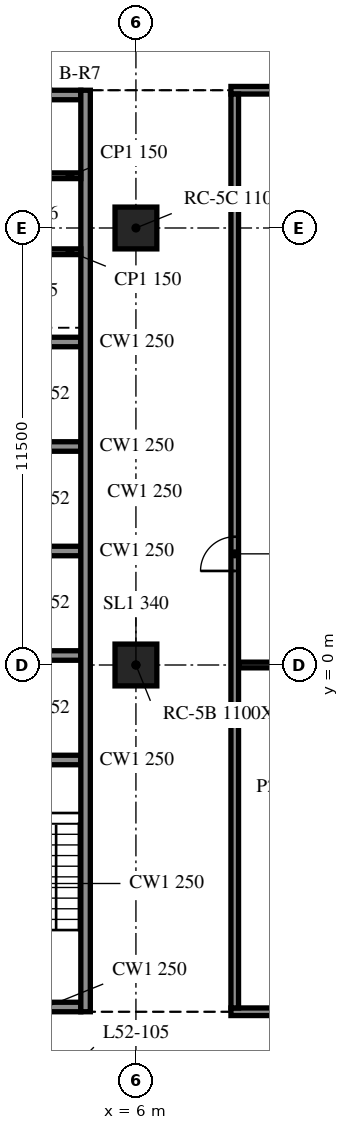
"""IFC4 building model, lengths in metres.
Left out: names, types, materials, properties, quantities, classifications, styles, units other than length and angle.
Written with IfcOpenShell. Run it as: python <this file> out.ifc"""

import sys

from ifc_helpers import new_model, si_unit, direction, frame, frame_2d, origin, origin_2d, place, context, subcontext, project, spatial, rectangle, extrude, element, fill, save


model = new_model("IFC4")
c1 = context("Model", 3, precision=1e-05, world=origin(), true_north=direction((0.0, 1.0)))
c2 = subcontext(c1, "Body", "Model", "MODEL_VIEW")
j1 = project(units=[si_unit("LENGTHUNIT", "METRE"), si_unit("PLANEANGLEUNIT", "RADIAN")], contexts=[c1])
p1 = place(None, origin())
s1 = spatial("IfcSite", under=j1, at=p1, CompositionType="ELEMENT")
p2 = place(p1, origin())
s2 = spatial("IfcBuilding", under=s1, at=p2, CompositionType="ELEMENT")
p3 = place(p2, frame((0.0, 0.0, 216.7)))
s3 = spatial("IfcBuildingStorey", under=s2, at=p3, CompositionType="ELEMENT", Elevation=216.7)
for number, where, z_axis, x_axis in (
    (1, (6.0, 0.0, -0.34), (0.0, 0.0, 1.0), (1.0, 0.0, 0.0)),
    (2, (6.0, 11.5, -0.34), (0.0, 0.0, 1.0), (1.0, 0.0, 0.0)),
):
    element("IfcColumn", number, at=place(p3, frame(where, z_axis=z_axis, x_axis=x_axis)), inside=s3, PredefinedType="COLUMN", context=c2, shape_type="SweptSolid", body=[
        extrude(rectangle(XDim=1.1, YDim=1.1, at=origin_2d()), origin(), (0.0, 0.0, 1.0), 3.8),
    ])
p4 = place(p3, frame((4.675, -9.125, 0.0), z_axis=(0.0, 0.0, 1.0), x_axis=(0.0, 1.0, 0.0)))
e3 = element("IfcWall", 3, at=p4, inside=s3, PredefinedType="SOLIDWALL", context=c2, shape_type="SweptSolid", body=[
    extrude(rectangle(XDim=24.25, YDim=0.25, at=frame_2d((12.125, 0.0))), origin(), (0.0, 0.0, 1.0), 3.46),
])
p5 = place(p3, frame((4.55, -9.0, 0.0), z_axis=(0.0, 0.0, 1.0), x_axis=(-1.0, 0.0, 0.0)))
e4 = element("IfcWall", 4, at=p5, inside=s3, PredefinedType="SOLIDWALL", context=c2, shape_type="SweptSolid", body=[
    extrude(rectangle(XDim=9.1, YDim=0.25, at=frame_2d((4.55, 0.0))), origin(), (0.0, 0.0, 1.0), 3.46),
])
p6 = place(p5, frame((3.65, 0.0, 0.0)))
e5 = element("IfcOpeningElement", 5, at=p6, cuts=e4, PredefinedType="OPENING", context=c2, shape_type="SweptSolid", body=[
    extrude(rectangle(XDim=1.8, YDim=2.1, at=frame_2d((0.9, 1.05))), frame((0.0, 0.135, 0.0), z_axis=(0.0, -1.0, 0.0), x_axis=(1.0, 0.0, 0.0)), (0.0, 0.0, 1.0), 0.27),
])
p7 = place(p3, frame((-4.55, 15.0, 0.0), z_axis=(0.0, 0.0, 1.0), x_axis=(1.0, 0.0, 0.0)))
e6 = element("IfcWall", 6, at=p7, inside=s3, PredefinedType="SOLIDWALL", context=c2, shape_type="SweptSolid", body=[
    extrude(rectangle(XDim=9.1, YDim=0.25, at=frame_2d((4.55, 0.0))), origin(), (0.0, 0.0, 1.0), 3.46),
])
p8 = place(p7, frame((3.65, 0.0, 0.0)))
e7 = element("IfcOpeningElement", 7, at=p8, cuts=e6, PredefinedType="OPENING", context=c2, shape_type="SweptSolid", body=[
    extrude(rectangle(XDim=1.8, YDim=2.1, at=frame_2d((0.9, 1.05))), frame((0.0, 0.135, 0.0), z_axis=(0.0, -1.0, 0.0), x_axis=(1.0, 0.0, 0.0)), (0.0, 0.0, 1.0), 0.27),
])
for number, where, z_axis, x_axis in (
    (8, (1.7, -2.5, 0.0), (0.0, 0.0, 1.0), (1.0, 0.0, 0.0)),
    (9, (1.7, 0.25, 0.0), (0.0, 0.0, 1.0), (1.0, 0.0, 0.0)),
    (10, (1.7, 3.0, 0.0), (0.0, 0.0, 1.0), (1.0, 0.0, 0.0)),
    (11, (1.7, 5.75, 0.0), (0.0, 0.0, 1.0), (1.0, 0.0, 0.0)),
    (12, (1.7, 8.5, 0.0), (0.0, 0.0, 1.0), (1.0, 0.0, 0.0)),
):
    element("IfcWall", number, at=place(p3, frame(where, z_axis=z_axis, x_axis=x_axis)), inside=s3, PredefinedType="SOLIDWALL", context=c2, shape_type="SweptSolid", body=[
        extrude(rectangle(XDim=2.85, YDim=0.25, at=frame_2d((1.425, 0.0))), origin(), (0.0, 0.0, 1.0), 3.46),
    ])
for number, where, z_axis, x_axis in (
    (13, (1.7, 10.875, 0.0), (0.0, 0.0, 1.0), (1.0, 0.0, 0.0)),
    (14, (1.7, 12.875, 0.0), (0.0, 0.0, 1.0), (1.0, 0.0, 0.0)),
):
    element("IfcWall", number, at=place(p3, frame(where, z_axis=z_axis, x_axis=x_axis)), inside=s3, PredefinedType="PARTITIONING", context=c2, shape_type="SweptSolid", body=[
        extrude(rectangle(XDim=2.85, YDim=0.15, at=frame_2d((1.425, 0.0))), origin(), (0.0, 0.0, 1.0), 3.46),
    ])
p9 = place(p3, frame((8.5, -9.125, 0.0), z_axis=(0.0, 0.0, 1.0), x_axis=(1.0, 0.0, 0.0)))
e15 = element("IfcWall", 15, at=p9, inside=s3, PredefinedType="PARTITIONING", context=c2, shape_type="SweptSolid", body=[
    extrude(rectangle(XDim=6.9, YDim=0.2, at=frame_2d((3.45, 0.0))), origin(), (0.0, 0.0, 1.0), 3.46),
])
p10 = place(p9, frame((2.9, 0.0, 0.0)))
e16 = element("IfcOpeningElement", 16, at=p10, cuts=e15, PredefinedType="OPENING", context=c2, shape_type="SweptSolid", body=[
    extrude(rectangle(XDim=0.9, YDim=2.1, at=frame_2d((0.45, 1.05))), frame((0.0, 0.11, 0.0), z_axis=(0.0, -1.0, 0.0), x_axis=(1.0, 0.0, 0.0)), (0.0, 0.0, 1.0), 0.22),
])
p11 = place(p3, frame((8.7, 0.0, 0.0), z_axis=(0.0, 0.0, 1.0), x_axis=(1.0, 0.0, 0.0)))
e17 = element("IfcWall", 17, at=p11, inside=s3, PredefinedType="PARTITIONING", context=c2, shape_type="SweptSolid", body=[
    extrude(rectangle(XDim=6.5, YDim=0.15, at=frame_2d((3.25, 0.0))), origin(), (0.0, 0.0, 1.0), 3.46),
])
p12 = place(p3, frame((8.5, 15.125, 0.0), z_axis=(0.0, 0.0, 1.0), x_axis=(1.0, 0.0, 0.0)))
e18 = element("IfcWall", 18, at=p12, inside=s3, PredefinedType="PARTITIONING", context=c2, shape_type="SweptSolid", body=[
    extrude(rectangle(XDim=6.9, YDim=0.2, at=frame_2d((3.45, 0.0))), origin(), (0.0, 0.0, 1.0), 3.46),
])
p13 = place(p3, frame((8.6, -9.025, 0.0), z_axis=(0.0, 0.0, 1.0), x_axis=(0.0, 1.0, 0.0)))
e19 = element("IfcWall", 19, at=p13, inside=s3, PredefinedType="PARTITIONING", context=c2, shape_type="SweptSolid", body=[
    extrude(rectangle(XDim=24.05, YDim=0.2, at=frame_2d((12.025, 0.0))), origin(), (0.0, 0.0, 1.0), 3.46),
])
p14 = place(p13, frame((11.5, 0.0, 0.0)))
e20 = element("IfcOpeningElement", 20, at=p14, cuts=e19, PredefinedType="OPENING", context=c2, shape_type="SweptSolid", body=[
    extrude(rectangle(XDim=0.9, YDim=2.1, at=frame_2d((0.45, 1.05))), frame((0.0, 0.11, 0.0), z_axis=(0.0, -1.0, 0.0), x_axis=(1.0, 0.0, 0.0)), (0.0, 0.0, 1.0), 0.22),
])
p15 = place(p14, origin())
e21 = element("IfcDoor", 21, at=p15, inside=s3, OperationType="SINGLE_SWING_RIGHT", PredefinedType="DOOR", context=c2, shape_type="SweptSolid", body=[
    extrude(rectangle(XDim=0.9, YDim=2.1, at=frame_2d((0.45, 1.05))), frame((0.0, 0.025, 0.0), z_axis=(0.0, -1.0, 0.0), x_axis=(1.0, 0.0, 0.0)), (0.0, 0.0, 1.0), 0.05),
])
fill(e20, e21)
save(model, sys.argv[1])
